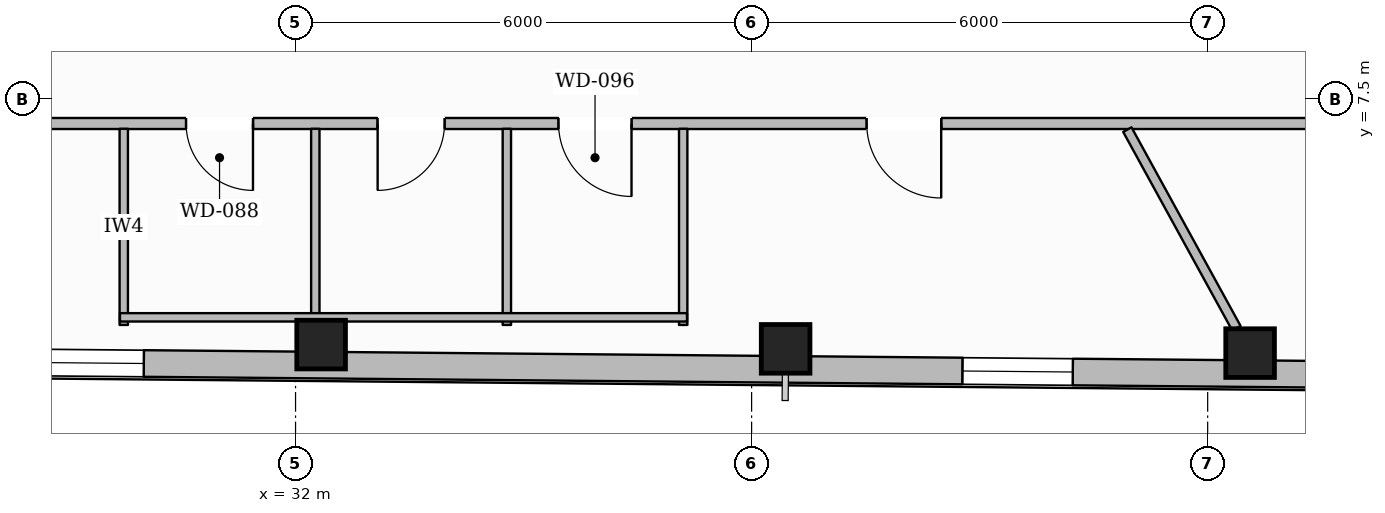
"""IFC4 building model, lengths in metres.
Left out: names, types, materials, properties, quantities, classifications, styles, units other than length and angle.
Written with IfcOpenShell. Run it as: python <this file> out.ifc"""

import sys

from ifc_helpers import new_model, si_unit, direction, frame, frame_2d, origin, origin_2d, place, context, subcontext, project, spatial, rectangle, hollow_rectangle, extrude, element, fill, save


model = new_model("IFC4")
c1 = context("Model", 3, precision=1e-05, world=origin(), true_north=direction((0.0, 1.0)))
c2 = subcontext(c1, "Body", "Model", "MODEL_VIEW")
j1 = project(units=[si_unit("LENGTHUNIT", "METRE"), si_unit("PLANEANGLEUNIT", "RADIAN")], contexts=[c1])
p1 = place(None, origin())
s1 = spatial("IfcSite", under=j1, at=p1, CompositionType="ELEMENT")
p2 = place(p1, origin())
s2 = spatial("IfcBuilding", under=s1, at=p2, CompositionType="ELEMENT")
p3 = place(p2, frame((0.0, 0.0, 184.25)))
s3 = spatial("IfcBuildingStorey", under=s2, at=p3, CompositionType="ELEMENT", Elevation=184.25)
for number, where, z_axis, x_axis in (
    (1, (32.336, 4.271, 0.0), (0.0, 0.0, 1.0), (1.0, 0.0, 0.0)),
    (2, (38.448, 4.215, 0.0), (0.0, 0.0, 1.0), (1.0, 0.0, 0.0)),
    (3, (44.558, 4.159, 0.0), (0.0, 0.0, 1.0), (1.0, 0.0, 0.0)),
):
    element("IfcColumn", number, at=place(p3, frame(where, z_axis=z_axis, x_axis=x_axis)), inside=s3, PredefinedType="COLUMN", context=c2, shape_type="SweptSolid", body=[
        extrude(hollow_rectangle(XDim=0.64, YDim=0.64, WallThickness=0.028, at=origin_2d()), origin(), (0.0, 0.0, 1.0), 3.6),
    ])
p4 = place(p3, frame((57.259, 3.773, 0.0), z_axis=(0.0, 0.0, 1.0), x_axis=(-0.999958016909, 0.009163210113, 0.0)))
e4 = element("IfcWall", 4, at=p4, inside=s3, PredefinedType="STANDARD", context=c2, shape_type="SweptSolid", body=[
    extrude(rectangle(XDim=37.621, YDim=0.35, at=frame_2d((18.81, 0.0))), origin(), (0.0, 0.0, 1.0), 3.132),
])
p5 = place(p4, frame((33.368, 0.0, 0.65)))
e5 = element("IfcOpeningElement", 5, at=p5, cuts=e4, PredefinedType="OPENING", context=c2, shape_type="SweptSolid", body=[
    extrude(rectangle(XDim=1.45, YDim=1.75, at=frame_2d((0.725, 0.875))), frame((0.0, 0.185, 0.0), z_axis=(0.0, -1.0, 0.0), x_axis=(1.0, 0.0, 0.0)), (0.0, 0.0, 1.0), 0.37),
])
p6 = place(p4, frame((27.257, 0.0, 0.65)))
e6 = element("IfcOpeningElement", 6, at=p6, cuts=e4, PredefinedType="OPENING", context=c2, shape_type="SweptSolid", body=[
    extrude(rectangle(XDim=1.45, YDim=1.75, at=frame_2d((0.725, 0.875))), frame((0.0, 0.185, 0.0), z_axis=(0.0, -1.0, 0.0), x_axis=(1.0, 0.0, 0.0)), (0.0, 0.0, 1.0), 0.37),
])
p7 = place(p4, frame((15.034, 0.0, 0.65)))
e7 = element("IfcOpeningElement", 7, at=p7, cuts=e4, PredefinedType="OPENING", context=c2, shape_type="SweptSolid", body=[
    extrude(rectangle(XDim=1.45, YDim=1.75, at=frame_2d((0.725, 0.875))), frame((0.0, 0.185, 0.0), z_axis=(0.0, -1.0, 0.0), x_axis=(1.0, 0.0, 0.0)), (0.0, 0.0, 1.0), 0.37),
])
p8 = place(p4, frame((8.923, 0.0, 0.65)))
e8 = element("IfcOpeningElement", 8, at=p8, cuts=e4, PredefinedType="OPENING", context=c2, shape_type="SweptSolid", body=[
    extrude(rectangle(XDim=1.45, YDim=1.75, at=frame_2d((0.725, 0.875))), frame((0.0, 0.185, 0.0), z_axis=(0.0, -1.0, 0.0), x_axis=(1.0, 0.0, 0.0)), (0.0, 0.0, 1.0), 0.37),
])
p9 = place(p4, frame((2.812, 0.0, 0.65)))
e9 = element("IfcOpeningElement", 9, at=p9, cuts=e4, PredefinedType="OPENING", context=c2, shape_type="SweptSolid", body=[
    extrude(rectangle(XDim=1.45, YDim=1.75, at=frame_2d((0.725, 0.875))), frame((0.0, 0.185, 0.0), z_axis=(0.0, -1.0, 0.0), x_axis=(1.0, 0.0, 0.0)), (0.0, 0.0, 1.0), 0.37),
])
p10 = place(p3, frame((49.94, 7.18, 0.0), z_axis=(0.0, 0.0, 1.0), x_axis=(-1.0, 0.0, 0.0)))
e10 = element("IfcWall", 10, at=p10, inside=s3, PredefinedType="PARTITIONING", context=c2, shape_type="SweptSolid", body=[
    extrude(rectangle(XDim=23.88, YDim=0.145, at=frame_2d((11.94, 0.0))), origin(), (0.0, 0.0, 1.0), 3.6),
])
p11 = place(p10, frame((18.5, 0.0, 0.0)))
e11 = element("IfcOpeningElement", 11, at=p11, cuts=e10, PredefinedType="OPENING", context=c2, shape_type="SweptSolid", body=[
    extrude(rectangle(XDim=0.88, YDim=2.1, at=frame_2d((0.44, 1.05))), frame((0.0, 0.083, 0.0), z_axis=(0.0, -1.0, 0.0), x_axis=(1.0, 0.0, 0.0)), (0.0, 0.0, 1.0), 0.165),
])
p12 = place(p10, frame((15.98, 0.0, 0.0)))
e12 = element("IfcOpeningElement", 12, at=p12, cuts=e10, PredefinedType="OPENING", context=c2, shape_type="SweptSolid", body=[
    extrude(rectangle(XDim=0.88, YDim=2.1, at=frame_2d((0.44, 1.05))), frame((0.0, 0.083, 0.0), z_axis=(0.0, -1.0, 0.0), x_axis=(1.0, 0.0, 0.0)), (0.0, 0.0, 1.0), 0.165),
])
p13 = place(p10, frame((13.52, 0.0, 0.0)))
e13 = element("IfcOpeningElement", 13, at=p13, cuts=e10, PredefinedType="OPENING", context=c2, shape_type="SweptSolid", body=[
    extrude(rectangle(XDim=0.96, YDim=2.1, at=frame_2d((0.48, 1.05))), frame((0.0, 0.083, 0.0), z_axis=(0.0, -1.0, 0.0), x_axis=(1.0, 0.0, 0.0)), (0.0, 0.0, 1.0), 0.165),
])
p14 = place(p10, frame((9.446, 0.0, 0.0)))
e14 = element("IfcOpeningElement", 14, at=p14, cuts=e10, PredefinedType="OPENING", context=c2, shape_type="SweptSolid", body=[
    extrude(rectangle(XDim=0.98, YDim=2.15, at=frame_2d((0.49, 1.075))), frame((0.0, 0.083, 0.0), z_axis=(0.0, -1.0, 0.0), x_axis=(1.0, 0.0, 0.0)), (0.0, 0.0, 1.0), 0.165),
])
p15 = place(p3, frame((29.74, 4.53, 0.0), z_axis=(0.0, 0.0, 1.0), x_axis=(0.0, 1.0, 0.0)))
e15 = element("IfcWall", 15, at=p15, inside=s3, PredefinedType="PLUMBINGWALL", context=c2, shape_type="SweptSolid", body=[
    extrude(rectangle(XDim=2.58, YDim=0.11, at=frame_2d((1.29, 0.0))), origin(), (0.0, 0.0, 1.0), 3.6),
])
p16 = place(p3, frame((32.26, 4.53, 0.0), z_axis=(0.0, 0.0, 1.0), x_axis=(0.0, 1.0, 0.0)))
e16 = element("IfcWall", 16, at=p16, inside=s3, PredefinedType="PLUMBINGWALL", context=c2, shape_type="SweptSolid", body=[
    extrude(rectangle(XDim=2.58, YDim=0.11, at=frame_2d((1.29, 0.0))), origin(), (0.0, 0.0, 1.0), 3.141),
])
for number, where, z_axis, x_axis in (
    (17, (34.78, 4.53, 0.0), (0.0, 0.0, 1.0), (0.0, 1.0, 0.0)),
    (18, (37.1, 4.53, 0.0), (0.0, 0.0, 1.0), (0.0, 1.0, 0.0)),
):
    element("IfcWall", number, at=place(p3, frame(where, z_axis=z_axis, x_axis=x_axis)), inside=s3, PredefinedType="PLUMBINGWALL", context=c2, shape_type="SweptSolid", body=[
        extrude(rectangle(XDim=2.58, YDim=0.11, at=frame_2d((1.29, 0.0))), origin(), (0.0, 0.0, 1.0), 3.6),
    ])
p17 = place(p3, frame((29.69, 4.63, 0.0), z_axis=(0.0, 0.0, 1.0), x_axis=(1.0, 0.0, 0.0)))
e19 = element("IfcWall", 19, at=p17, inside=s3, PredefinedType="PLUMBINGWALL", context=c2, shape_type="SweptSolid", body=[
    extrude(rectangle(XDim=7.46, YDim=0.11, at=frame_2d((3.73, 0.0))), origin(), (0.0, 0.0, 1.0), 3.6),
])
p18 = place(p3, frame((42.943, 7.1, 0.0), z_axis=(0.0, 0.0, 1.0), x_axis=(0.481352610258, -0.876527047271, 0.0)))
e20 = element("IfcWall", 20, at=p18, inside=s3, PredefinedType="PARTITIONING", context=c2, shape_type="SweptSolid", body=[
    extrude(rectangle(XDim=2.98, YDim=0.125, at=frame_2d((1.49, 0.0))), origin(), (0.0, 0.0, 1.0), 3.6),
])
p19 = place(p6, origin())
e21 = element("IfcWindow", 21, at=p19, inside=s3, PartitioningType="SINGLE_PANEL", PredefinedType="WINDOW", context=c2, shape_type="SweptSolid", body=[
    extrude(rectangle(XDim=1.45, YDim=1.75, at=frame_2d((0.725, 0.875))), frame((0.0, 0.03, 0.0), z_axis=(0.0, -1.0, 0.0), x_axis=(1.0, 0.0, 0.0)), (0.0, 0.0, 1.0), 0.06),
])
fill(e6, e21)
p20 = place(p7, origin())
e22 = element("IfcWindow", 22, at=p20, inside=s3, PartitioningType="SINGLE_PANEL", PredefinedType="WINDOW", context=c2, shape_type="SweptSolid", body=[
    extrude(rectangle(XDim=1.45, YDim=1.75, at=frame_2d((0.725, 0.875))), frame((0.0, 0.03, 0.0), z_axis=(0.0, -1.0, 0.0), x_axis=(1.0, 0.0, 0.0)), (0.0, 0.0, 1.0), 0.06),
])
fill(e7, e22)
p21 = place(p11, origin())
e23 = element("IfcDoor", 23, at=p21, inside=s3, OperationType="SINGLE_SWING_LEFT", PredefinedType="DOOR", context=c2, shape_type="SweptSolid", body=[
    extrude(rectangle(XDim=0.88, YDim=2.1, at=frame_2d((0.44, 1.05))), frame((0.0, 0.025, 0.0), z_axis=(0.0, -1.0, 0.0), x_axis=(1.0, 0.0, 0.0)), (0.0, 0.0, 1.0), 0.05),
])
fill(e11, e23)
p22 = place(p12, origin())
e24 = element("IfcDoor", 24, at=p22, inside=s3, OperationType="SINGLE_SWING_RIGHT", PredefinedType="DOOR", context=c2, shape_type="SweptSolid", body=[
    extrude(rectangle(XDim=0.88, YDim=2.1, at=frame_2d((0.44, 1.05))), frame((0.0, 0.025, 0.0), z_axis=(0.0, -1.0, 0.0), x_axis=(1.0, 0.0, 0.0)), (0.0, 0.0, 1.0), 0.05),
])
fill(e12, e24)
p23 = place(p13, origin())
e25 = element("IfcDoor", 25, at=p23, inside=s3, OperationType="SINGLE_SWING_LEFT", PredefinedType="DOOR", context=c2, shape_type="SweptSolid", body=[
    extrude(rectangle(XDim=0.96, YDim=2.1, at=frame_2d((0.48, 1.05))), frame((0.0, 0.025, 0.0), z_axis=(0.0, -1.0, 0.0), x_axis=(1.0, 0.0, 0.0)), (0.0, 0.0, 1.0), 0.05),
])
fill(e13, e25)
p24 = place(p14, origin())
e26 = element("IfcDoor", 26, at=p24, inside=s3, OperationType="SINGLE_SWING_LEFT", PredefinedType="DOOR", context=c2, shape_type="SweptSolid", body=[
    extrude(rectangle(XDim=0.98, YDim=2.15, at=frame_2d((0.49, 1.075))), frame((0.0, 0.025, 0.0), z_axis=(0.0, -1.0, 0.0), x_axis=(1.0, 0.0, 0.0)), (0.0, 0.0, 1.0), 0.05),
])
fill(e14, e26)
save(model, sys.argv[1])
